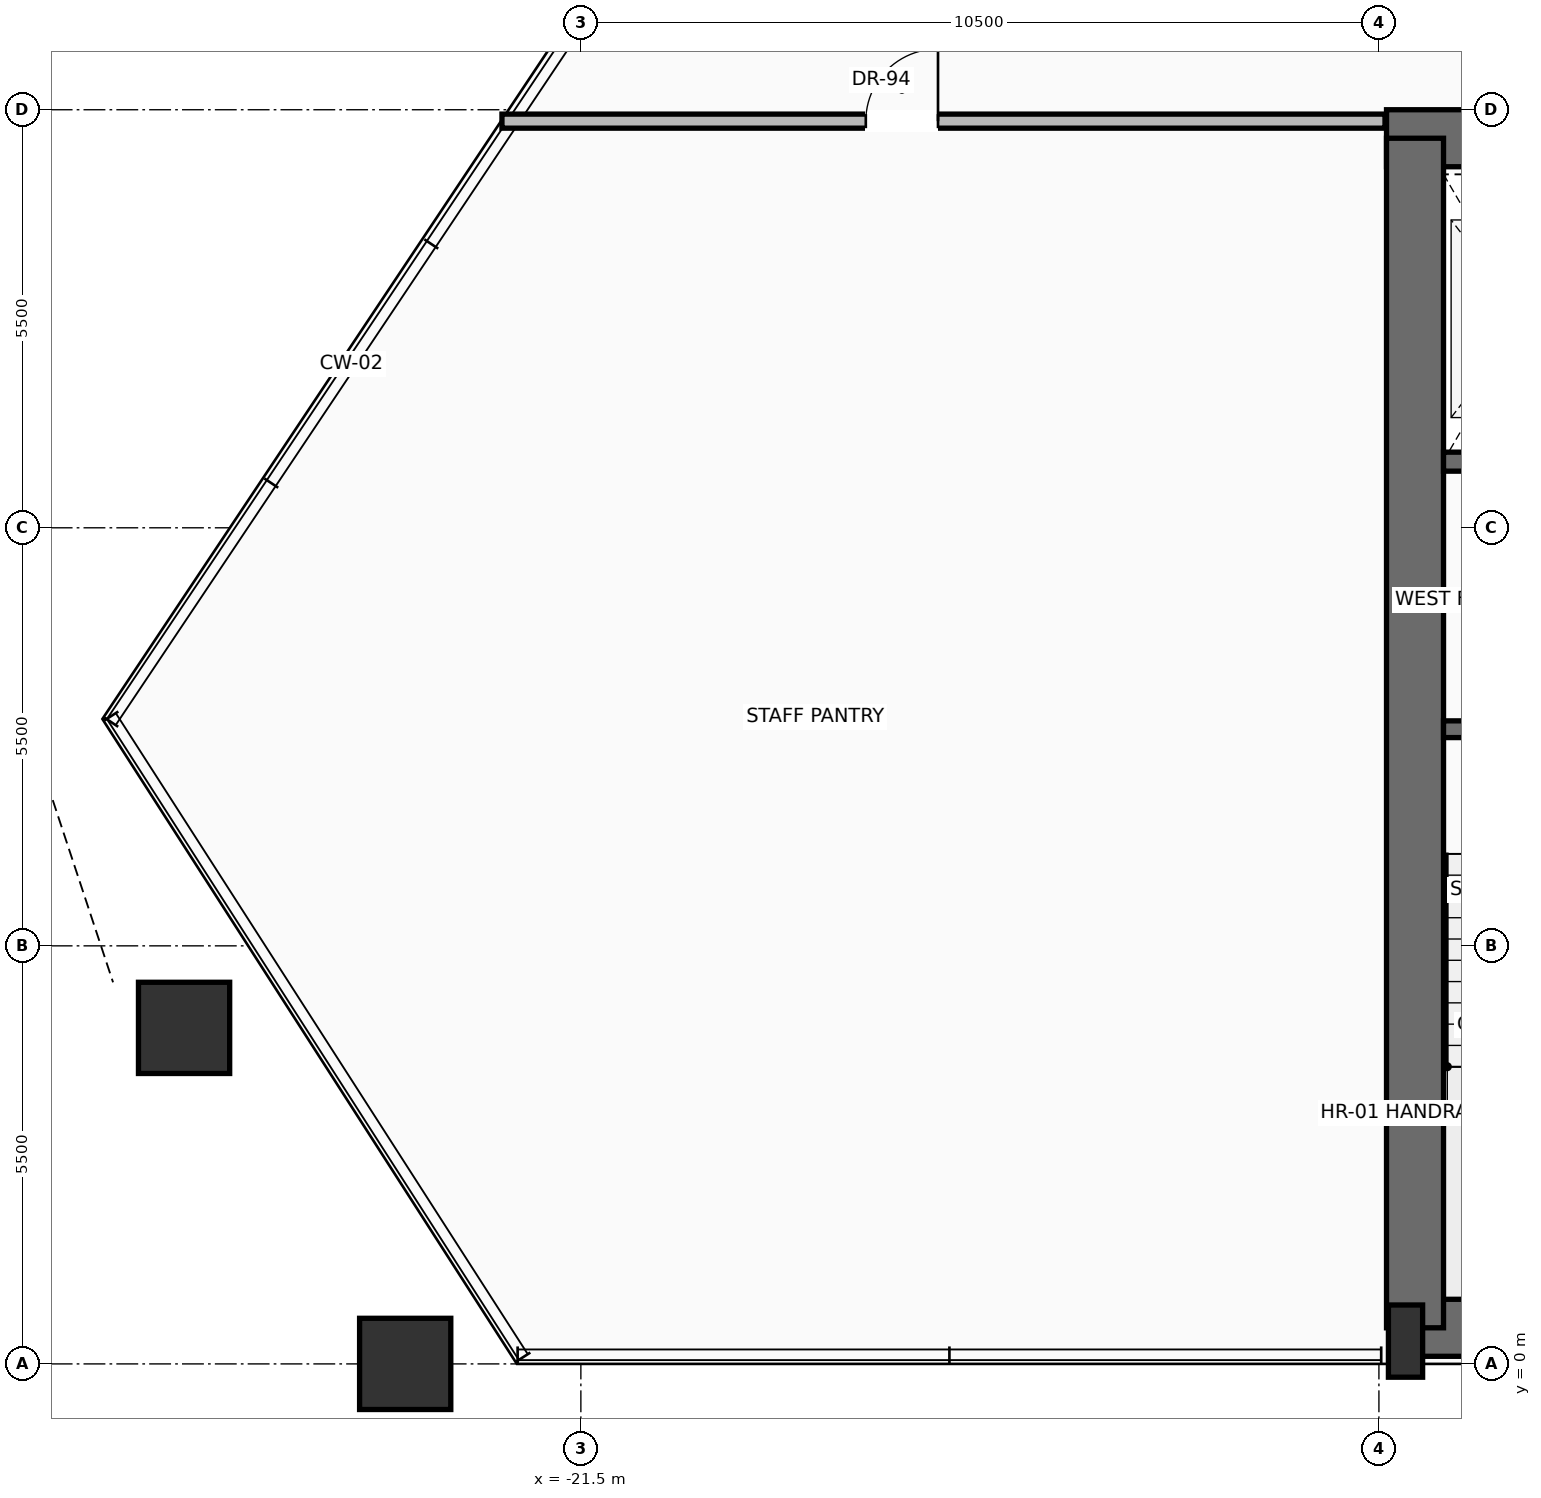
"""IFC4 building model, lengths in metres.
Left out: names, types, materials, properties, quantities, classifications, styles, units other than length and angle.
Written with IfcOpenShell. Run it as: python <this file> out.ifc"""

import sys

from ifc_helpers import new_model, si_unit, direction, frame, frame_2d, origin, origin_2d, place, context, subcontext, project, spatial, rectangle, hollow_rectangle, extrude, source, transform, mapped, element, fill, save


model = new_model("IFC4")
c1 = context("Model", 3, precision=1e-05, world=origin(), true_north=direction((0.0, 1.0)))
c2 = subcontext(c1, "Body", "Model", "MODEL_VIEW")
j1 = project(units=[si_unit("LENGTHUNIT", "METRE"), si_unit("PLANEANGLEUNIT", "RADIAN")], contexts=[c1])
p1 = place(None, origin())
s1 = spatial("IfcSite", under=j1, at=p1, CompositionType="ELEMENT")
p2 = place(p1, origin())
s2 = spatial("IfcBuilding", under=s1, at=p2, CompositionType="ELEMENT")
p3 = place(p2, frame((0.0, 0.0, 109.9)))
s3 = spatial("IfcBuildingStorey", under=s2, at=p3, CompositionType="ELEMENT", Elevation=109.9)
p4 = place(p3, frame((-10.65, 0.475, 0.0), z_axis=(0.0, 0.0, 1.0), x_axis=(1.0, 0.0, 0.0)))
e1 = element("IfcWall", 1, at=p4, inside=s3, PredefinedType="SHEAR", context=c2, shape_type="SweptSolid", body=[
    extrude(rectangle(XDim=21.3, YDim=0.75, at=frame_2d((10.65, 0.0))), origin(), (0.0, 0.0, 1.0), 3.45),
])
p5 = place(p3, frame((-10.9, 16.125, 0.0), z_axis=(0.0, 0.0, 1.0), x_axis=(1.0, 0.0, 0.0)))
e2 = element("IfcWall", 2, at=p5, inside=s3, PredefinedType="SHEAR", context=c2, shape_type="SweptSolid", body=[
    extrude(rectangle(XDim=21.8, YDim=0.75, at=frame_2d((10.9, 0.0))), origin(), (0.0, 0.0, 1.0), 3.45),
])
p6 = place(p5, frame((3.47, 0.0, 0.0)))
e3 = element("IfcOpeningElement", 3, at=p6, cuts=e2, PredefinedType="OPENING", context=c2, shape_type="SweptSolid", body=[
    extrude(rectangle(XDim=1.3, YDim=2.3, at=frame_2d((0.65, 1.15))), frame((0.0, 0.385, 0.0), z_axis=(0.0, -1.0, 0.0), x_axis=(1.0, 0.0, 0.0)), (0.0, 0.0, 1.0), 0.77),
])
p7 = place(p5, frame((9.9, 0.0, 0.0)))
e4 = element("IfcOpeningElement", 4, at=p7, cuts=e2, PredefinedType="OPENING", context=c2, shape_type="SweptSolid", body=[
    extrude(rectangle(XDim=2.0, YDim=2.4, at=frame_2d((1.0, 1.2))), frame((0.0, 0.385, 0.0), z_axis=(0.0, -1.0, 0.0), x_axis=(1.0, 0.0, 0.0)), (0.0, 0.0, 1.0), 0.77),
])
p8 = place(p3, frame((-10.525, 0.475, 0.0), z_axis=(0.0, 0.0, 1.0), x_axis=(0.0, 1.0, 0.0)))
e5 = element("IfcWall", 5, at=p8, inside=s3, PredefinedType="SHEAR", context=c2, shape_type="SweptSolid", body=[
    extrude(rectangle(XDim=15.65, YDim=0.75, at=frame_2d((7.825, 0.0))), origin(), (0.0, 0.0, 1.0), 3.45),
])
m1 = source(origin(), c2, "Body", "SweptSolid", [
    extrude(rectangle(XDim=0.45, YDim=0.95, at=origin_2d()), origin(), (0.0, 0.0, 1.0), 3.7),
])
p9 = place(p3, frame((-10.65, 0.3, 0.0), z_axis=(0.0, 0.0, 1.0), x_axis=(1.0, 0.0, 0.0)))
e6 = element("IfcColumn", 6, at=p9, inside=s3, PredefinedType="PILASTER", context=c2, shape_type="MappedRepresentation", body=[
    mapped(m1, transform((0.0, 0.0, 0.0), scale=1.0)),
])
m2 = source(origin(), c2, "Body", "SweptSolid", [
    extrude(hollow_rectangle(XDim=1.2, YDim=1.2, WallThickness=0.06, at=origin_2d()), origin(), (0.0, 0.0, 1.0), 3.692),
])
p10 = place(p3, frame((-23.811, 0.0, 0.004), z_axis=(-0.013226356189, 0.0, 0.999912527925), x_axis=(0.0, -1.0, 0.0)))
e7 = element("IfcColumn", 7, at=p10, inside=s3, PredefinedType="COLUMN", context=c2, shape_type="MappedRepresentation", body=[
    mapped(m2, transform((0.0, 0.0, 0.0), scale=1.0)),
])
m3 = source(origin(), c2, "Body", "SweptSolid", [
    extrude(hollow_rectangle(XDim=1.2, YDim=1.2, WallThickness=0.06, at=origin_2d()), origin(), (0.0, 0.0, 1.0), 3.692),
])
p11 = place(p3, frame((-26.721, 4.421, 0.004), z_axis=(-0.001256438272, -0.016664339181, 0.99986035083), x_axis=(0.997169720587, -0.075183431314, 0.0)))
e8 = element("IfcColumn", 8, at=p11, inside=s3, PredefinedType="COLUMN", context=c2, shape_type="MappedRepresentation", body=[
    mapped(m3, transform((0.0, 0.0, 0.0), scale=1.0)),
])
p12 = place(p3, frame((-5.5, 8.35, 0.0), z_axis=(0.0, 0.0, 1.0), x_axis=(-1.0, 0.0, 0.0)))
e9 = element("IfcWall", 9, at=p12, inside=s3, PredefinedType="SOLIDWALL", context=c2, shape_type="SweptSolid", body=[
    extrude(rectangle(XDim=4.65, YDim=0.22, at=frame_2d((2.325, 0.0))), origin(), (0.0, 0.0, 1.0), 3.45),
])
p13 = place(p12, frame((2.5, 0.0, 0.0)))
e10 = element("IfcOpeningElement", 10, at=p13, cuts=e9, PredefinedType="OPENING", context=c2, shape_type="SweptSolid", body=[
    extrude(rectangle(XDim=1.15, YDim=2.2, at=frame_2d((0.575, 1.1))), frame((0.0, 0.12, 0.0), z_axis=(0.0, -1.0, 0.0), x_axis=(1.0, 0.0, 0.0)), (0.0, 0.0, 1.0), 0.24),
])
p14 = place(p3, frame((-5.5, 11.87, 0.0), z_axis=(0.0, 0.0, 1.0), x_axis=(-1.0, 0.0, 0.0)))
e11 = element("IfcWall", 11, at=p14, inside=s3, PredefinedType="SOLIDWALL", context=c2, shape_type="SweptSolid", body=[
    extrude(rectangle(XDim=4.65, YDim=0.25, at=frame_2d((2.325, 0.0))), origin(), (0.0, 0.0, 1.0), 3.45),
])
p15 = place(p14, frame((2.95, 0.0, 0.0)))
e12 = element("IfcOpeningElement", 12, at=p15, cuts=e11, PredefinedType="OPENING", context=c2, shape_type="SweptSolid", body=[
    extrude(rectangle(XDim=1.2, YDim=2.25, at=frame_2d((0.6, 1.125))), frame((0.0, 0.135, 0.0), z_axis=(0.0, -1.0, 0.0), x_axis=(1.0, 0.0, 0.0)), (0.0, 0.0, 1.0), 0.27),
])
p16 = place(p3, frame((-22.538, 16.35, 0.0), z_axis=(0.0, 0.0, 1.0), x_axis=(1.0, 0.0, 0.0)))
e13 = element("IfcWall", 13, at=p16, inside=s3, PredefinedType="PARTITIONING", context=c2, shape_type="SweptSolid", body=[
    extrude(rectangle(XDim=11.618, YDim=0.185, at=frame_2d((5.809, 0.0))), origin(), (0.0, 0.0, 1.0), 2.747),
])
p17 = place(p16, frame((4.787, 0.0, 0.0)))
e14 = element("IfcOpeningElement", 14, at=p17, cuts=e13, PredefinedType="OPENING", context=c2, shape_type="SweptSolid", body=[
    extrude(rectangle(XDim=0.95, YDim=2.2, at=frame_2d((0.475, 1.1))), frame((0.0, 0.103, 0.0), z_axis=(0.0, -1.0, 0.0), x_axis=(1.0, 0.0, 0.0)), (0.0, 0.0, 1.0), 0.205),
])
m4 = source(origin(), c2, "Body", "SweptSolid", [
    extrude(rectangle(XDim=0.95, YDim=2.2, at=frame_2d((0.475, 1.1))), frame((0.0, 0.025, 0.0), z_axis=(0.0, -1.0, 0.0), x_axis=(1.0, 0.0, 0.0)), (0.0, 0.0, 1.0), 0.05),
])
p18 = place(p17, origin())
e15 = element("IfcDoor", 15, at=p18, inside=s3, OperationType="SINGLE_SWING_RIGHT", PredefinedType="DOOR", context=c2, shape_type="MappedRepresentation", body=[
    mapped(m4, transform((0.0, 0.0, 0.0), scale=1.0)),
])
fill(e14, e15)
save(model, sys.argv[1])
